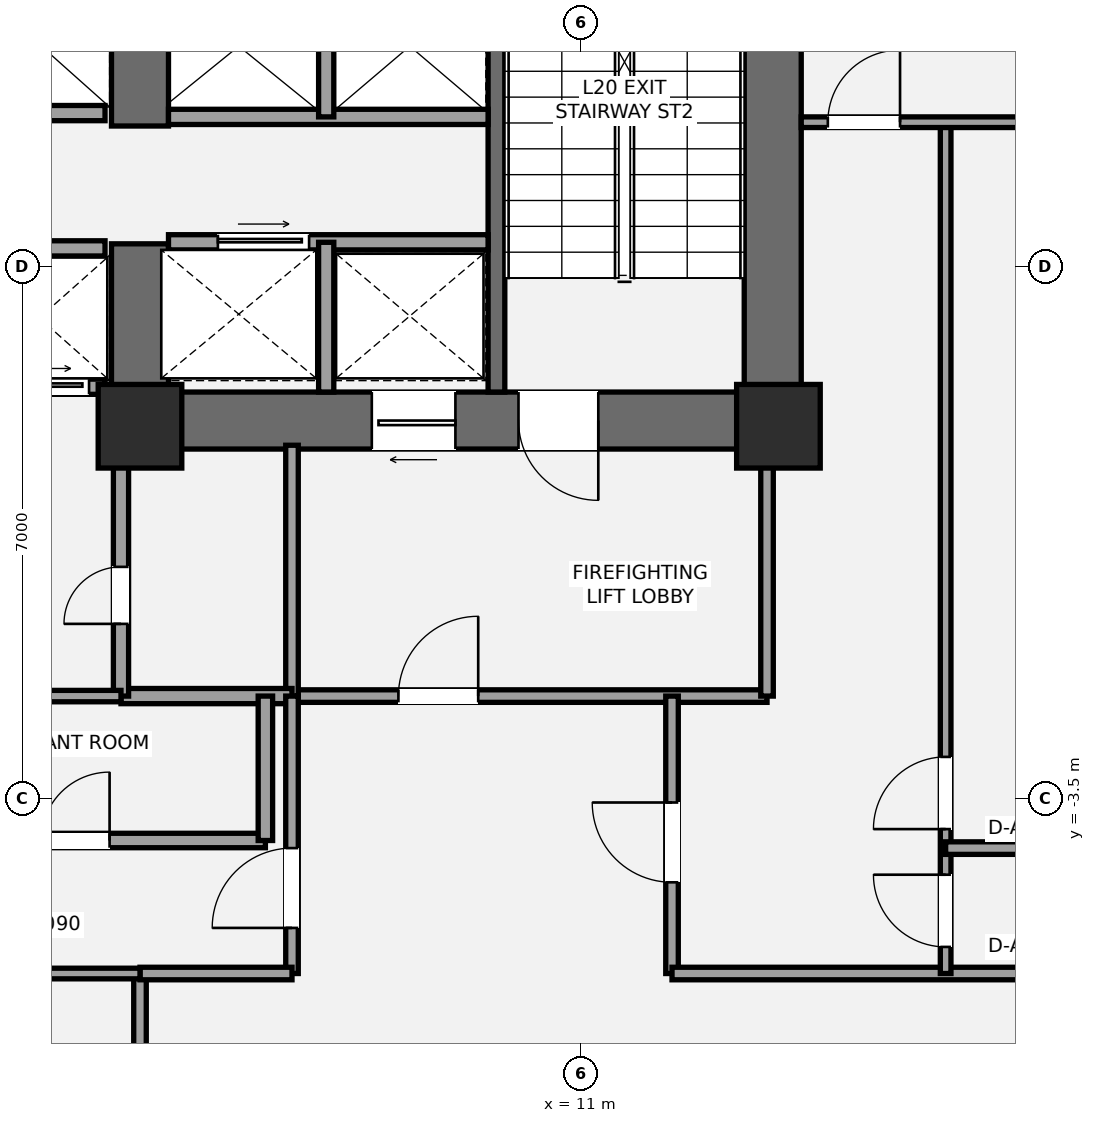
"""IFC4 building model, lengths in metres.
Left out: names, types, materials, properties, quantities, classifications, styles, units other than length and angle.
Written with IfcOpenShell. Run it as: python <this file> out.ifc"""

import sys

from ifc_helpers import new_model, si_unit, direction, frame, frame_2d, origin, origin_2d, place, context, subcontext, project, spatial, rectangle, extrude, element, fill, save


model = new_model("IFC4")
c1 = context("Model", 3, precision=1e-05, world=origin(), true_north=direction((0.0, 1.0)))
c2 = subcontext(c1, "Body", "Model", "MODEL_VIEW")
j1 = project(units=[si_unit("LENGTHUNIT", "METRE"), si_unit("PLANEANGLEUNIT", "RADIAN")], contexts=[c1])
p1 = place(None, origin())
s1 = spatial("IfcSite", under=j1, at=p1, CompositionType="ELEMENT")
p2 = place(p1, origin())
s2 = spatial("IfcBuilding", under=s1, at=p2, CompositionType="ELEMENT")
p3 = place(p2, frame((0.0, 0.0, 77.4)))
s3 = spatial("IfcBuildingStorey", under=s2, at=p3, CompositionType="ELEMENT", Elevation=77.4)
p4 = place(p3, frame((13.525, 1.1, 0.0), z_axis=(0.0, 0.0, 1.0), x_axis=(0.0, 1.0, 0.0)))
e1 = element("IfcWall", 1, at=p4, inside=s3, PredefinedType="SHEAR", context=c2, shape_type="SweptSolid", body=[
    extrude(rectangle(XDim=8.65, YDim=0.75, at=frame_2d((4.325, 0.0))), origin(), (0.0, 0.0, 1.0), 4.5),
])
p5 = place(p3, frame((13.9, 1.475, 0.0), z_axis=(0.0, 0.0, 1.0), x_axis=(-1.0, 0.0, 0.0)))
e2 = element("IfcWall", 2, at=p5, inside=s3, PredefinedType="SHEAR", context=c2, shape_type="SweptSolid", body=[
    extrude(rectangle(XDim=9.075, YDim=0.75, at=frame_2d((4.538, 0.0))), origin(), (0.0, 0.0, 1.0), 4.5),
])
p6 = place(p5, frame((2.67, 0.0, 0.0)))
e3 = element("IfcOpeningElement", 3, at=p6, cuts=e2, PredefinedType="OPENING", context=c2, shape_type="SweptSolid", body=[
    extrude(rectangle(XDim=1.05, YDim=2.15, at=frame_2d((0.525, 1.075))), frame((0.0, 0.385, 0.0), z_axis=(0.0, -1.0, 0.0), x_axis=(1.0, 0.0, 0.0)), (0.0, 0.0, 1.0), 0.77),
])
p7 = place(p5, frame((4.55, 0.0, 0.0)))
e4 = element("IfcOpeningElement", 4, at=p7, cuts=e2, PredefinedType="OPENING", context=c2, shape_type="SweptSolid", body=[
    extrude(rectangle(XDim=1.1, YDim=2.2, at=frame_2d((0.55, 1.1))), frame((0.0, 0.385, 0.0), z_axis=(0.0, -1.0, 0.0), x_axis=(1.0, 0.0, 0.0)), (0.0, 0.0, 1.0), 0.77),
])
p8 = place(p3, frame((5.2, 1.1, 0.0), z_axis=(0.0, 0.0, 1.0), x_axis=(0.0, 1.0, 0.0)))
e5 = element("IfcWall", 5, at=p8, inside=s3, PredefinedType="SHEAR", context=c2, shape_type="SweptSolid", body=[
    extrude(rectangle(XDim=2.7, YDim=0.75, at=frame_2d((1.35, 0.0))), origin(), (0.0, 0.0, 1.0), 4.5),
])
p9 = place(p3, frame((5.2, 5.35, 0.0), z_axis=(0.0, 0.0, 1.0), x_axis=(0.0, 1.0, 0.0)))
e6 = element("IfcWall", 6, at=p9, inside=s3, PredefinedType="SHEAR", context=c2, shape_type="SweptSolid", body=[
    extrude(rectangle(XDim=2.0, YDim=0.75, at=frame_2d((1.0, 0.0))), origin(), (0.0, 0.0, 1.0), 4.5),
])
p10 = place(p3, frame((9.89, 1.85, 0.0), z_axis=(0.0, 0.0, 1.0), x_axis=(0.0, 1.0, 0.0)))
e7 = element("IfcWall", 7, at=p10, inside=s3, PredefinedType="SHEAR", context=c2, shape_type="SweptSolid", body=[
    extrude(rectangle(XDim=7.15, YDim=0.22, at=frame_2d((3.575, 0.0))), origin(), (0.0, 0.0, 1.0), 4.5),
])
for number, where, z_axis, x_axis in (
    (8, (5.2, 1.4, 0.0), (0.0, 0.0, 1.0), (1.0, 0.0, 0.0)),
    (9, (13.6, 1.4, 0.0), (0.0, 0.0, 1.0), (1.0, 0.0, 0.0)),
):
    element("IfcColumn", number, at=place(p3, frame(where, z_axis=z_axis, x_axis=x_axis)), inside=s3, PredefinedType="COLUMN", context=c2, shape_type="SweptSolid", body=[
        extrude(rectangle(XDim=1.1, YDim=1.1, at=origin_2d()), origin(), (0.0, 0.0, 1.0), 4.5),
    ])
p11 = place(p3, frame((7.2, -2.15, 0.0), z_axis=(0.0, 0.0, 1.0), x_axis=(1.0, 0.0, 0.0)))
e10 = element("IfcWall", 10, at=p11, inside=s3, PredefinedType="PARTITIONING", context=c2, shape_type="SweptSolid", body=[
    extrude(rectangle(XDim=6.25, YDim=0.165, at=frame_2d((3.125, 0.0))), origin(), (0.0, 0.0, 1.0), 4.28),
])
p12 = place(p11, frame((1.4, 0.0, 0.0)))
e11 = element("IfcOpeningElement", 11, at=p12, cuts=e10, PredefinedType="OPENING", context=c2, shape_type="SweptSolid", body=[
    extrude(rectangle(XDim=1.05, YDim=2.15, at=frame_2d((0.525, 1.075))), frame((0.0, 0.093, 0.0), z_axis=(0.0, -1.0, 0.0), x_axis=(1.0, 0.0, 0.0)), (0.0, 0.0, 1.0), 0.185),
])
p13 = place(p3, frame((7.2, -2.15, 0.0), z_axis=(0.0, 0.0, 1.0), x_axis=(0.0, 1.0, 0.0)))
e12 = element("IfcWall", 12, at=p13, inside=s3, PredefinedType="PARTITIONING", context=c2, shape_type="SweptSolid", body=[
    extrude(rectangle(XDim=3.3, YDim=0.165, at=frame_2d((1.65, 0.0))), origin(), (0.0, 0.0, 1.0), 3.733),
])
p14 = place(p3, frame((13.45, -2.15, 0.0), z_axis=(0.0, 0.0, 1.0), x_axis=(0.0, 1.0, 0.0)))
e13 = element("IfcWall", 13, at=p14, inside=s3, PredefinedType="PARTITIONING", context=c2, shape_type="SweptSolid", body=[
    extrude(rectangle(XDim=3.3, YDim=0.165, at=frame_2d((1.65, 0.0))), origin(), (0.0, 0.0, 1.0), 2.47),
])
p15 = place(p3, frame((4.95, -2.15, 0.0), z_axis=(0.0, 0.0, 1.0), x_axis=(1.0, 0.0, 0.0)))
e14 = element("IfcWall", 14, at=p15, inside=s3, PredefinedType="SOLIDWALL", context=c2, shape_type="SweptSolid", body=[
    extrude(rectangle(XDim=2.25, YDim=0.2, at=frame_2d((1.125, 0.0))), origin(), (0.0, 0.0, 1.0), 2.47),
])
p16 = place(p3, frame((4.95, -2.15, 0.0), z_axis=(0.0, 0.0, 1.0), x_axis=(0.0, 1.0, 0.0)))
e15 = element("IfcWall", 15, at=p16, inside=s3, PredefinedType="SOLIDWALL", context=c2, shape_type="SweptSolid", body=[
    extrude(rectangle(XDim=3.3, YDim=0.2, at=frame_2d((1.65, 0.0))), origin(), (0.0, 0.0, 1.0), 2.47),
])
p17 = place(p16, frame((0.95, 0.0, 0.0)))
e16 = element("IfcOpeningElement", 16, at=p17, cuts=e15, PredefinedType="OPENING", context=c2, shape_type="SweptSolid", body=[
    extrude(rectangle(XDim=0.75, YDim=2.1, at=frame_2d((0.375, 1.05))), frame((0.0, 0.11, 0.0), z_axis=(0.0, -1.0, 0.0), x_axis=(1.0, 0.0, 0.0)), (0.0, 0.0, 1.0), 0.22),
])
p18 = place(p3, frame((5.575, 3.82, 0.0), z_axis=(0.0, 0.0, 1.0), x_axis=(1.0, 0.0, 0.0)))
e17 = element("IfcWall", 17, at=p18, inside=s3, PredefinedType="SOLIDWALL", context=c2, shape_type="SweptSolid", body=[
    extrude(rectangle(XDim=4.205, YDim=0.2, at=frame_2d((2.103, 0.0))), origin(), (0.0, 0.0, 1.0), 4.28),
])
p19 = place(p18, frame((0.65, 0.0, 0.0)))
e18 = element("IfcOpeningElement", 18, at=p19, cuts=e17, PredefinedType="OPENING", context=c2, shape_type="SweptSolid", body=[
    extrude(rectangle(XDim=1.2, YDim=2.2, at=frame_2d((0.6, 1.1))), frame((0.0, 0.11, 0.0), z_axis=(0.0, -1.0, 0.0), x_axis=(1.0, 0.0, 0.0)), (0.0, 0.0, 1.0), 0.22),
])
p20 = place(p3, frame((7.65, 1.85, 0.0), z_axis=(0.0, 0.0, 1.0), x_axis=(0.0, 1.0, 0.0)))
e19 = element("IfcWall", 19, at=p20, inside=s3, PredefinedType="SOLIDWALL", context=c2, shape_type="SweptSolid", body=[
    extrude(rectangle(XDim=1.97, YDim=0.2, at=frame_2d((0.985, 0.0))), origin(), (0.0, 0.0, 1.0), 4.28),
])
p21 = place(p3, frame((5.575, 5.47, 0.0), z_axis=(0.0, 0.0, 1.0), x_axis=(1.0, 0.0, 0.0)))
e20 = element("IfcWall", 20, at=p21, inside=s3, PredefinedType="SOLIDWALL", context=c2, shape_type="SweptSolid", body=[
    extrude(rectangle(XDim=4.205, YDim=0.2, at=frame_2d((2.103, 0.0))), origin(), (0.0, 0.0, 1.0), 4.28),
])
p22 = place(p3, frame((7.65, 5.47, 0.0), z_axis=(0.0, 0.0, 1.0), x_axis=(0.0, 1.0, 0.0)))
e21 = element("IfcWall", 21, at=p22, inside=s3, PredefinedType="SOLIDWALL", context=c2, shape_type="SweptSolid", body=[
    extrude(rectangle(XDim=1.86, YDim=0.2, at=frame_2d((0.93, 0.0))), origin(), (0.0, 0.0, 1.0), 4.28),
])
p23 = place(p3, frame((0.88, 1.92, 0.0), z_axis=(0.0, 0.0, 1.0), x_axis=(1.0, 0.0, 0.0)))
e22 = element("IfcWall", 22, at=p23, inside=s3, PredefinedType="SOLIDWALL", context=c2, shape_type="SweptSolid", body=[
    extrude(rectangle(XDim=3.86, YDim=0.2, at=frame_2d((1.93, 0.0))), origin(), (0.0, 0.0, 1.0), 3.27),
])
p24 = place(p23, frame((0.55, 0.0, 0.0)))
e23 = element("IfcOpeningElement", 23, at=p24, cuts=e22, PredefinedType="OPENING", context=c2, shape_type="SweptSolid", body=[
    extrude(rectangle(XDim=1.1, YDim=2.2, at=frame_2d((0.55, 1.1))), frame((0.0, 0.11, 0.0), z_axis=(0.0, -1.0, 0.0), x_axis=(1.0, 0.0, 0.0)), (0.0, 0.0, 1.0), 0.22),
])
p25 = place(p23, frame((2.55, 0.0, 0.0)))
e24 = element("IfcOpeningElement", 24, at=p25, cuts=e22, PredefinedType="OPENING", context=c2, shape_type="SweptSolid", body=[
    extrude(rectangle(XDim=1.1, YDim=2.2, at=frame_2d((0.55, 1.1))), frame((0.0, 0.11, 0.0), z_axis=(0.0, -1.0, 0.0), x_axis=(1.0, 0.0, 0.0)), (0.0, 0.0, 1.0), 0.22),
])
for number, where, z_axis, x_axis in (
    (25, (0.88, 3.74, 0.0), (0.0, 0.0, 1.0), (1.0, 0.0, 0.0)),
    (26, (0.88, 5.52, 0.0), (0.0, 0.0, 1.0), (1.0, 0.0, 0.0)),
):
    element("IfcWall", number, at=place(p3, frame(where, z_axis=z_axis, x_axis=x_axis)), inside=s3, PredefinedType="SOLIDWALL", context=c2, shape_type="SweptSolid", body=[
        extrude(rectangle(XDim=3.86, YDim=0.2, at=frame_2d((1.93, 0.0))), origin(), (0.0, 0.0, 1.0), 4.28),
    ])
p26 = place(p3, frame((2.1, -4.05, 0.0), z_axis=(0.0, 0.0, 1.0), x_axis=(1.0, 0.0, 0.0)))
e27 = element("IfcWall", 27, at=p26, inside=s3, PredefinedType="PLUMBINGWALL", context=c2, shape_type="SweptSolid", body=[
    extrude(rectangle(XDim=4.75, YDim=0.19, at=frame_2d((2.375, 0.0))), origin(), (0.0, 0.0, 1.0), 2.47),
])
p27 = place(p26, frame((1.8, 0.0, 0.0)))
e28 = element("IfcOpeningElement", 28, at=p27, cuts=e27, PredefinedType="OPENING", context=c2, shape_type="SweptSolid", body=[
    extrude(rectangle(XDim=0.9, YDim=2.1, at=frame_2d((0.45, 1.05))), frame((0.0, 0.105, 0.0), z_axis=(0.0, -1.0, 0.0), x_axis=(1.0, 0.0, 0.0)), (0.0, 0.0, 1.0), 0.21),
])
p28 = place(p3, frame((2.1, -2.15, 0.0), z_axis=(0.0, 0.0, 1.0), x_axis=(1.0, 0.0, 0.0)))
e29 = element("IfcWall", 29, at=p28, inside=s3, PredefinedType="PLUMBINGWALL", context=c2, shape_type="SweptSolid", body=[
    extrude(rectangle(XDim=2.85, YDim=0.15, at=frame_2d((1.425, 0.0))), origin(), (0.0, 0.0, 1.0), 4.28),
])
p29 = place(p3, frame((6.85, -4.05, 0.0), z_axis=(0.0, 0.0, 1.0), x_axis=(0.0, 1.0, 0.0)))
e30 = element("IfcWall", 30, at=p29, inside=s3, PredefinedType="PLUMBINGWALL", context=c2, shape_type="SweptSolid", body=[
    extrude(rectangle(XDim=1.9, YDim=0.19, at=frame_2d((0.95, 0.0))), origin(), (0.0, 0.0, 1.0), 4.28),
])
p30 = place(p3, frame((7.2, -5.8, 0.0), z_axis=(0.0, 0.0, 1.0), x_axis=(0.0, 1.0, 0.0)))
e31 = element("IfcWall", 31, at=p30, inside=s3, PredefinedType="PARTITIONING", context=c2, shape_type="SweptSolid", body=[
    extrude(rectangle(XDim=3.65, YDim=0.165, at=frame_2d((1.825, 0.0))), origin(), (0.0, 0.0, 1.0), 3.733),
])
p31 = place(p30, frame((0.6, 0.0, 0.0)))
e32 = element("IfcOpeningElement", 32, at=p31, cuts=e31, PredefinedType="OPENING", context=c2, shape_type="SweptSolid", body=[
    extrude(rectangle(XDim=1.05, YDim=2.15, at=frame_2d((0.525, 1.075))), frame((0.0, 0.093, 0.0), z_axis=(0.0, -1.0, 0.0), x_axis=(1.0, 0.0, 0.0)), (0.0, 0.0, 1.0), 0.185),
])
p32 = place(p3, frame((12.2, -5.8, 0.0), z_axis=(0.0, 0.0, 1.0), x_axis=(0.0, 1.0, 0.0)))
e33 = element("IfcWall", 33, at=p32, inside=s3, PredefinedType="PARTITIONING", context=c2, shape_type="SweptSolid", body=[
    extrude(rectangle(XDim=3.65, YDim=0.165, at=frame_2d((1.825, 0.0))), origin(), (0.0, 0.0, 1.0), 3.733),
])
p33 = place(p32, frame((1.2, 0.0, 0.0)))
e34 = element("IfcOpeningElement", 34, at=p33, cuts=e33, PredefinedType="OPENING", context=c2, shape_type="SweptSolid", body=[
    extrude(rectangle(XDim=1.05, YDim=2.15, at=frame_2d((0.525, 1.075))), frame((0.0, 0.093, 0.0), z_axis=(0.0, -1.0, 0.0), x_axis=(1.0, 0.0, 0.0)), (0.0, 0.0, 1.0), 0.185),
])
p34 = place(p3, frame((5.2, -18.634, 0.0), z_axis=(0.0, 0.0, 1.0), x_axis=(0.0, 1.0, 0.0)))
e35 = element("IfcWall", 35, at=p34, inside=s3, PredefinedType="PARTITIONING", context=c2, shape_type="SweptSolid", body=[
    extrude(rectangle(XDim=12.834, YDim=0.165, at=frame_2d((6.417, 0.0))), origin(), (0.0, 0.0, 1.0), 3.733),
])
p35 = place(p3, frame((5.2, -5.8, 0.0), z_axis=(0.0, 0.0, 1.0), x_axis=(1.0, 0.0, 0.0)))
e36 = element("IfcWall", 36, at=p35, inside=s3, PredefinedType="PARTITIONING", context=c2, shape_type="SweptSolid", body=[
    extrude(rectangle(XDim=2.0, YDim=0.165, at=frame_2d((1.0, 0.0))), origin(), (0.0, 0.0, 1.0), 2.47),
])
p36 = place(p3, frame((12.2, -5.8, 0.0), z_axis=(0.0, 0.0, 1.0), x_axis=(1.0, 0.0, 0.0)))
e37 = element("IfcWall", 37, at=p36, inside=s3, PredefinedType="PARTITIONING", context=c2, shape_type="SweptSolid", body=[
    extrude(rectangle(XDim=14.75, YDim=0.165, at=frame_2d((7.375, 0.0))), origin(), (0.0, 0.0, 1.0), 2.47),
])
p37 = place(p3, frame((-5.2, -5.8, 0.0), z_axis=(0.0, 0.0, 1.0), x_axis=(1.0, 0.0, 0.0)))
e38 = element("IfcWall", 38, at=p37, inside=s3, PredefinedType="PARTITIONING", context=c2, shape_type="SweptSolid", body=[
    extrude(rectangle(XDim=10.4, YDim=0.14, at=frame_2d((5.2, 0.0))), origin(), (0.0, 0.0, 1.0), 4.28),
])
p38 = place(p37, frame((1.8, 0.0, 0.0)))
e39 = element("IfcOpeningElement", 39, at=p38, cuts=e38, PredefinedType="OPENING", context=c2, shape_type="SweptSolid", body=[
    extrude(rectangle(XDim=0.95, YDim=2.15, at=frame_2d((0.475, 1.075))), frame((0.0, 0.08, 0.0), z_axis=(0.0, -1.0, 0.0), x_axis=(1.0, 0.0, 0.0)), (0.0, 0.0, 1.0), 0.16),
])
p39 = place(p37, frame((7.0, 0.0, 0.0)))
e40 = element("IfcOpeningElement", 40, at=p39, cuts=e38, PredefinedType="OPENING", context=c2, shape_type="SweptSolid", body=[
    extrude(rectangle(XDim=0.95, YDim=2.15, at=frame_2d((0.475, 1.075))), frame((0.0, 0.08, 0.0), z_axis=(0.0, -1.0, 0.0), x_axis=(1.0, 0.0, 0.0)), (0.0, 0.0, 1.0), 0.16),
])
p40 = place(p3, frame((15.8, -5.8, 0.0), z_axis=(0.0, 0.0, 1.0), x_axis=(0.0, 1.0, 0.0)))
e41 = element("IfcWall", 41, at=p40, inside=s3, PredefinedType="PARTITIONING", context=c2, shape_type="SweptSolid", body=[
    extrude(rectangle(XDim=11.2, YDim=0.14, at=frame_2d((5.6, 0.0))), origin(), (0.0, 0.0, 1.0), 2.47),
])
p41 = place(p40, frame((0.35, 0.0, 0.0)))
e42 = element("IfcOpeningElement", 42, at=p41, cuts=e41, PredefinedType="OPENING", context=c2, shape_type="SweptSolid", body=[
    extrude(rectangle(XDim=0.95, YDim=2.15, at=frame_2d((0.475, 1.075))), frame((0.0, 0.08, 0.0), z_axis=(0.0, -1.0, 0.0), x_axis=(1.0, 0.0, 0.0)), (0.0, 0.0, 1.0), 0.16),
])
p42 = place(p40, frame((1.9, 0.0, 0.0)))
e43 = element("IfcOpeningElement", 43, at=p42, cuts=e41, PredefinedType="OPENING", context=c2, shape_type="SweptSolid", body=[
    extrude(rectangle(XDim=0.95, YDim=2.15, at=frame_2d((0.475, 1.075))), frame((0.0, 0.08, 0.0), z_axis=(0.0, -1.0, 0.0), x_axis=(1.0, 0.0, 0.0)), (0.0, 0.0, 1.0), 0.16),
])
p43 = place(p3, frame((13.9, 5.4, 0.0), z_axis=(0.0, 0.0, 1.0), x_axis=(1.0, 0.0, 0.0)))
e44 = element("IfcWall", 44, at=p43, inside=s3, PredefinedType="PARTITIONING", context=c2, shape_type="SweptSolid", body=[
    extrude(rectangle(XDim=13.27, YDim=0.14, at=frame_2d((6.635, 0.0))), origin(), (0.0, 0.0, 1.0), 3.733),
])
p44 = place(p43, frame((0.35, 0.0, 0.0)))
e45 = element("IfcOpeningElement", 45, at=p44, cuts=e44, PredefinedType="OPENING", context=c2, shape_type="SweptSolid", body=[
    extrude(rectangle(XDim=0.95, YDim=2.15, at=frame_2d((0.475, 1.075))), frame((0.0, 0.08, 0.0), z_axis=(0.0, -1.0, 0.0), x_axis=(1.0, 0.0, 0.0)), (0.0, 0.0, 1.0), 0.16),
])
p45 = place(p3, frame((15.8, -4.15, 0.0), z_axis=(0.0, 0.0, 1.0), x_axis=(1.0, 0.0, 0.0)))
e46 = element("IfcWall", 46, at=p45, inside=s3, PredefinedType="PARTITIONING", context=c2, shape_type="SweptSolid", body=[
    extrude(rectangle(XDim=11.737, YDim=0.165, at=frame_2d((5.868, 0.0))), origin(), (0.0, 0.0, 1.0), 2.47),
])
p46 = place(p6, origin())
e47 = element("IfcDoor", 47, at=p46, inside=s3, OperationType="SINGLE_SWING_LEFT", PredefinedType="DOOR", context=c2, shape_type="SweptSolid", body=[
    extrude(rectangle(XDim=1.05, YDim=2.15, at=frame_2d((0.525, 1.075))), frame((0.0, 0.025, 0.0), z_axis=(0.0, -1.0, 0.0), x_axis=(1.0, 0.0, 0.0)), (0.0, 0.0, 1.0), 0.05),
])
fill(e3, e47)
p47 = place(p17, origin())
e48 = element("IfcDoor", 48, at=p47, inside=s3, OperationType="SINGLE_SWING_LEFT", PredefinedType="DOOR", context=c2, shape_type="SweptSolid", body=[
    extrude(rectangle(XDim=0.75, YDim=2.1, at=frame_2d((0.375, 1.05))), frame((0.0, 0.025, 0.0), z_axis=(0.0, -1.0, 0.0), x_axis=(1.0, 0.0, 0.0)), (0.0, 0.0, 1.0), 0.05),
])
fill(e16, e48)
p48 = place(p7, origin())
e49 = element("IfcDoor", 49, at=p48, inside=s3, OperationType="SLIDING_TO_LEFT", PredefinedType="DOOR", context=c2, shape_type="SweptSolid", body=[
    extrude(rectangle(XDim=1.1, YDim=2.2, at=frame_2d((0.55, 1.1))), frame((0.0, 0.025, 0.0), z_axis=(0.0, -1.0, 0.0), x_axis=(1.0, 0.0, 0.0)), (0.0, 0.0, 1.0), 0.05),
])
fill(e4, e49)
p49 = place(p19, origin())
e50 = element("IfcDoor", 50, at=p49, inside=s3, OperationType="SLIDING_TO_RIGHT", PredefinedType="DOOR", context=c2, shape_type="SweptSolid", body=[
    extrude(rectangle(XDim=1.2, YDim=2.2, at=frame_2d((0.6, 1.1))), frame((0.0, 0.025, 0.0), z_axis=(0.0, -1.0, 0.0), x_axis=(1.0, 0.0, 0.0)), (0.0, 0.0, 1.0), 0.05),
])
fill(e18, e50)
p50 = place(p25, origin())
e51 = element("IfcDoor", 51, at=p50, inside=s3, OperationType="SLIDING_TO_LEFT", PredefinedType="DOOR", context=c2, shape_type="SweptSolid", body=[
    extrude(rectangle(XDim=1.1, YDim=2.2, at=frame_2d((0.55, 1.1))), frame((0.0, 0.025, 0.0), z_axis=(0.0, -1.0, 0.0), x_axis=(1.0, 0.0, 0.0)), (0.0, 0.0, 1.0), 0.05),
])
fill(e24, e51)
p51 = place(p27, origin())
e52 = element("IfcDoor", 52, at=p51, inside=s3, OperationType="SINGLE_SWING_RIGHT", PredefinedType="DOOR", context=c2, shape_type="SweptSolid", body=[
    extrude(rectangle(XDim=0.9, YDim=2.1, at=frame_2d((0.45, 1.05))), frame((0.0, 0.025, 0.0), z_axis=(0.0, -1.0, 0.0), x_axis=(1.0, 0.0, 0.0)), (0.0, 0.0, 1.0), 0.05),
])
fill(e28, e52)
p52 = place(p12, origin())
e53 = element("IfcDoor", 53, at=p52, inside=s3, OperationType="SINGLE_SWING_RIGHT", PredefinedType="DOOR", context=c2, shape_type="SweptSolid", body=[
    extrude(rectangle(XDim=1.05, YDim=2.15, at=frame_2d((0.525, 1.075))), frame((0.0, 0.025, 0.0), z_axis=(0.0, -1.0, 0.0), x_axis=(1.0, 0.0, 0.0)), (0.0, 0.0, 1.0), 0.05),
])
fill(e11, e53)
p53 = place(p31, origin())
e54 = element("IfcDoor", 54, at=p53, inside=s3, OperationType="SINGLE_SWING_LEFT", PredefinedType="DOOR", context=c2, shape_type="SweptSolid", body=[
    extrude(rectangle(XDim=1.05, YDim=2.15, at=frame_2d((0.525, 1.075))), frame((0.0, 0.025, 0.0), z_axis=(0.0, -1.0, 0.0), x_axis=(1.0, 0.0, 0.0)), (0.0, 0.0, 1.0), 0.05),
])
fill(e32, e54)
p54 = place(p33, origin())
e55 = element("IfcDoor", 55, at=p54, inside=s3, OperationType="SINGLE_SWING_RIGHT", PredefinedType="DOOR", context=c2, shape_type="SweptSolid", body=[
    extrude(rectangle(XDim=1.05, YDim=2.15, at=frame_2d((0.525, 1.075))), frame((0.0, 0.025, 0.0), z_axis=(0.0, -1.0, 0.0), x_axis=(1.0, 0.0, 0.0)), (0.0, 0.0, 1.0), 0.05),
])
fill(e34, e55)
p55 = place(p41, origin())
e56 = element("IfcDoor", 56, at=p55, inside=s3, OperationType="SINGLE_SWING_RIGHT", PredefinedType="DOOR", context=c2, shape_type="SweptSolid", body=[
    extrude(rectangle(XDim=0.95, YDim=2.15, at=frame_2d((0.475, 1.075))), frame((0.0, 0.025, 0.0), z_axis=(0.0, -1.0, 0.0), x_axis=(1.0, 0.0, 0.0)), (0.0, 0.0, 1.0), 0.05),
])
fill(e42, e56)
p56 = place(p42, origin())
e57 = element("IfcDoor", 57, at=p56, inside=s3, OperationType="SINGLE_SWING_LEFT", PredefinedType="DOOR", context=c2, shape_type="SweptSolid", body=[
    extrude(rectangle(XDim=0.95, YDim=2.15, at=frame_2d((0.475, 1.075))), frame((0.0, 0.025, 0.0), z_axis=(0.0, -1.0, 0.0), x_axis=(1.0, 0.0, 0.0)), (0.0, 0.0, 1.0), 0.05),
])
fill(e43, e57)
p57 = place(p44, origin())
e58 = element("IfcDoor", 58, at=p57, inside=s3, OperationType="SINGLE_SWING_RIGHT", PredefinedType="DOOR", context=c2, shape_type="SweptSolid", body=[
    extrude(rectangle(XDim=0.95, YDim=2.15, at=frame_2d((0.475, 1.075))), frame((0.0, 0.025, 0.0), z_axis=(0.0, -1.0, 0.0), x_axis=(1.0, 0.0, 0.0)), (0.0, 0.0, 1.0), 0.05),
])
fill(e45, e58)
save(model, sys.argv[1])
